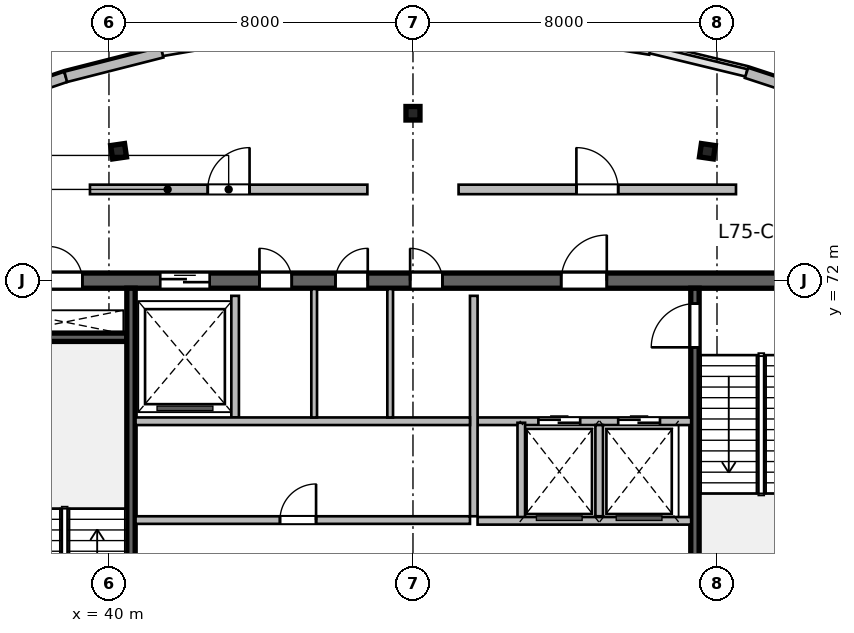
"""IFC4 building model, lengths in metres.
Left out: names, types, materials, properties, quantities, classifications, styles, units other than length and angle.
Written with IfcOpenShell. Run it as: python <this file> out.ifc"""

import sys

from ifc_helpers import new_model, si_unit, direction, frame, frame_2d, origin, origin_2d, place, context, subcontext, project, spatial, rectangle, i_section, extrude, source, transform, mapped, element, fill, save


model = new_model("IFC4")
c1 = context("Model", 3, precision=1e-05, world=origin(), true_north=direction((0.0, 1.0)))
c2 = subcontext(c1, "Body", "Model", "MODEL_VIEW")
j1 = project(units=[si_unit("LENGTHUNIT", "METRE"), si_unit("PLANEANGLEUNIT", "RADIAN")], contexts=[c1])
p1 = place(None, origin())
s1 = spatial("IfcSite", under=j1, at=p1, CompositionType="ELEMENT")
p2 = place(p1, origin())
s2 = spatial("IfcBuilding", under=s1, at=p2, CompositionType="ELEMENT")
p3 = place(p2, frame((0.0, 0.0, 307.8)))
s3 = spatial("IfcBuildingStorey", under=s2, at=p3, CompositionType="ELEMENT", Elevation=307.8)
m1 = source(origin(), c2, "Body", "SweptSolid", [
    extrude(rectangle(XDim=21.6, YDim=0.4, at=frame_2d((10.8, 0.0))), origin(), (0.0, 0.0, 1.0), 4.8),
])
p4 = place(p3, frame((37.2, 72.0, 0.0), z_axis=(0.0, 0.0, 1.0), x_axis=(1.0, 0.0, 0.0)))
e1 = element("IfcWall", 1, at=p4, inside=s3, PredefinedType="SHEAR", context=c2, shape_type="MappedRepresentation", body=[
    mapped(m1, transform((0.0, 0.0, 0.0), scale=1.0)),
])
p5 = place(p4, frame((1.2, 0.0, 0.0)))
e2 = element("IfcOpeningElement", 2, at=p5, cuts=e1, PredefinedType="OPENING", context=c2, shape_type="SweptSolid", body=[
    extrude(rectangle(XDim=0.9, YDim=2.1, at=frame_2d((0.45, 1.05))), frame((0.0, 0.21, 0.0), z_axis=(0.0, -1.0, 0.0), x_axis=(1.0, 0.0, 0.0)), (0.0, 0.0, 1.0), 0.42),
])
p6 = place(p4, frame((14.7, 0.0, 0.0)))
e3 = element("IfcOpeningElement", 3, at=p6, cuts=e1, PredefinedType="OPENING", context=c2, shape_type="SweptSolid", body=[
    extrude(rectangle(XDim=1.2, YDim=2.15, at=frame_2d((0.6, 1.075))), frame((0.0, 0.21, 0.0), z_axis=(0.0, -1.0, 0.0), x_axis=(1.0, 0.0, 0.0)), (0.0, 0.0, 1.0), 0.42),
])
p7 = place(p4, frame((4.15, 0.0, 0.0)))
e4 = element("IfcOpeningElement", 4, at=p7, cuts=e1, PredefinedType="OPENING", context=c2, shape_type="SweptSolid", body=[
    extrude(rectangle(XDim=1.3, YDim=2.15, at=frame_2d((0.65, 1.075))), frame((0.0, 0.21, 0.0), z_axis=(0.0, -1.0, 0.0), x_axis=(1.0, 0.0, 0.0)), (0.0, 0.0, 1.0), 0.42),
])
p8 = place(p4, frame((6.76, 0.0, 0.0)))
e5 = element("IfcOpeningElement", 5, at=p8, cuts=e1, PredefinedType="OPENING", context=c2, shape_type="SweptSolid", body=[
    extrude(rectangle(XDim=0.85, YDim=2.1, at=frame_2d((0.425, 1.05))), frame((0.0, 0.21, 0.0), z_axis=(0.0, -1.0, 0.0), x_axis=(1.0, 0.0, 0.0)), (0.0, 0.0, 1.0), 0.42),
])
p9 = place(p4, frame((8.76, 0.0, 0.0)))
e6 = element("IfcOpeningElement", 6, at=p9, cuts=e1, PredefinedType="OPENING", context=c2, shape_type="SweptSolid", body=[
    extrude(rectangle(XDim=0.85, YDim=2.1, at=frame_2d((0.425, 1.05))), frame((0.0, 0.21, 0.0), z_axis=(0.0, -1.0, 0.0), x_axis=(1.0, 0.0, 0.0)), (0.0, 0.0, 1.0), 0.42),
])
p10 = place(p4, frame((10.725, 0.0, 0.0)))
e7 = element("IfcOpeningElement", 7, at=p10, cuts=e1, PredefinedType="OPENING", context=c2, shape_type="SweptSolid", body=[
    extrude(rectangle(XDim=0.85, YDim=2.1, at=frame_2d((0.425, 1.05))), frame((0.0, 0.21, 0.0), z_axis=(0.0, -1.0, 0.0), x_axis=(1.0, 0.0, 0.0)), (0.0, 0.0, 1.0), 0.42),
])
m2 = source(origin(), c2, "Body", "SweptSolid", [
    extrude(rectangle(XDim=3.27, YDim=0.22, at=frame_2d((1.635, 0.0))), origin(), (0.0, 0.0, 1.0), 4.8),
])
p11 = place(p3, frame((37.2, 70.51, 0.0), z_axis=(0.0, 0.0, 1.0), x_axis=(1.0, 0.0, 0.0)))
e8 = element("IfcWall", 8, at=p11, inside=s3, PredefinedType="SHEAR", context=c2, shape_type="MappedRepresentation", body=[
    mapped(m2, transform((0.0, 0.0, 0.0), scale=1.0)),
])
m3 = source(origin(), c2, "Body", "SweptSolid", [
    extrude(rectangle(XDim=11.2, YDim=0.22, at=frame_2d((5.6, 0.0))), origin(), (0.0, 0.0, 1.0), 4.8),
])
p12 = place(p3, frame((40.58, 60.6, 0.0), z_axis=(0.0, 0.0, 1.0), x_axis=(0.0, 1.0, 0.0)))
e9 = element("IfcWall", 9, at=p12, inside=s3, PredefinedType="SHEAR", context=c2, shape_type="MappedRepresentation", body=[
    mapped(m3, transform((0.0, 0.0, 0.0), scale=1.0)),
])
p13 = place(p3, frame((55.42, 60.6, 0.0), z_axis=(0.0, 0.0, 1.0), x_axis=(0.0, 1.0, 0.0)))
e10 = element("IfcWall", 10, at=p13, inside=s3, PredefinedType="SHEAR", context=c2, shape_type="MappedRepresentation", body=[
    mapped(m3, transform((0.0, 0.0, 0.0), scale=1.0)),
])
p14 = place(p13, frame((9.645, 0.0, 0.0)))
e11 = element("IfcOpeningElement", 11, at=p14, cuts=e10, PredefinedType="OPENING", context=c2, shape_type="SweptSolid", body=[
    extrude(rectangle(XDim=1.15, YDim=2.15, at=frame_2d((0.575, 1.075))), frame((0.0, 0.12, 0.0), z_axis=(0.0, -1.0, 0.0), x_axis=(1.0, 0.0, 0.0)), (0.0, 0.0, 1.0), 0.24),
])
m4 = source(origin(), c2, "Body", "SweptSolid", [
    extrude(i_section(OverallWidth=0.369, OverallDepth=0.356, WebThickness=0.011, FlangeThickness=0.018, at=origin_2d()), origin(), (0.0, 0.0, 1.0), 4.8),
])
for number, where, z_axis, x_axis in (
    (12, (40.253, 75.404, 0.0), (0.0, 0.0, 1.0), (-0.143, 0.99, 0.0)),
    (13, (48.0, 76.404, 0.0), (0.0, 0.0, 1.0), (0.0, 1.0, 0.0)),
    (14, (55.747, 75.404, 0.0), (0.0, 0.0, 1.0), (0.143, 0.99, 0.0)),
):
    element("IfcColumn", number, at=place(p3, frame(where, z_axis=z_axis, x_axis=x_axis)), inside=s3, PredefinedType="COLUMN", context=c2, shape_type="MappedRepresentation", body=[
        mapped(m4, transform((0.0, 0.0, 0.0), scale=1.0)),
    ])
m5 = source(origin(), c2, "Body", "SweptSolid", [
    extrude(rectangle(XDim=2.64, YDim=0.28, at=frame_2d((1.32, 0.0))), origin(), (0.0, 0.0, 1.0), 4.5),
])
p15 = place(p3, frame((36.364, 76.511, 0.0), z_axis=(0.0, 0.0, 1.0), x_axis=(0.946685911962, 0.322158011064, 0.0)))
e15 = element("IfcWall", 15, at=p15, inside=s3, PredefinedType="SOLIDWALL", context=c2, shape_type="MappedRepresentation", body=[
    mapped(m5, transform((0.0, 0.0, 0.0), scale=1.0)),
])
m6 = source(origin(), c2, "Body", "SweptSolid", [
    extrude(rectangle(XDim=2.614, YDim=0.28, at=frame_2d((1.307, 0.0))), origin(), (0.0, 0.0, 1.0), 4.5),
])
p16 = place(p3, frame((38.863, 77.362, 0.0), z_axis=(0.0, 0.0, 1.0), x_axis=(0.969106509315, 0.246642602978, 0.0)))
e16 = element("IfcWall", 16, at=p16, inside=s3, PredefinedType="SOLIDWALL", context=c2, shape_type="MappedRepresentation", body=[
    mapped(m6, transform((0.0, 0.0, 0.0), scale=1.0)),
])
m7 = source(origin(), c2, "Body", "SweptSolid", [
    extrude(rectangle(XDim=2.593, YDim=0.28, at=frame_2d((1.296, 0.0))), origin(), (0.0, 0.0, 1.0), 4.5),
])
p17 = place(p3, frame((51.679, 78.488, 0.0), z_axis=(0.0, 0.0, 1.0), x_axis=(0.987661204406, -0.156605700126, 0.0)))
e17 = element("IfcWall", 17, at=p17, inside=s3, PredefinedType="SOLIDWALL", context=c2, shape_type="MappedRepresentation", body=[
    mapped(m7, transform((0.0, 0.0, 0.0), scale=1.0)),
])
m8 = source(origin(), c2, "Body", "SweptSolid", [
    extrude(rectangle(XDim=2.636, YDim=0.28, at=frame_2d((1.318, 0.0))), origin(), (0.0, 0.0, 1.0), 4.5),
])
p18 = place(p3, frame((56.777, 77.467, 0.0), z_axis=(0.0, 0.0, 1.0), x_axis=(0.950200321617, -0.311639774097, 0.0)))
e18 = element("IfcWall", 18, at=p18, inside=s3, PredefinedType="SOLIDWALL", context=c2, shape_type="MappedRepresentation", body=[
    mapped(m8, transform((0.0, 0.0, 0.0), scale=1.0)),
])
m9 = source(origin(), c2, "Body", "SweptSolid", [
    extrude(rectangle(XDim=5.62, YDim=0.2, at=frame_2d((2.81, 0.0))), origin(), (0.0, 0.0, 1.0), 4.5),
])
p19 = place(p3, frame((49.7, 68.3, 0.0), z_axis=(0.0, 0.0, 1.0), x_axis=(1.0, 0.0, 0.0)))
e19 = element("IfcWall", 19, at=p19, inside=s3, PredefinedType="SOLIDWALL", context=c2, shape_type="MappedRepresentation", body=[
    mapped(m9, transform((0.0, 0.0, 0.0), scale=1.0)),
])
p20 = place(p19, frame((1.6, 0.0, 0.0)))
e20 = element("IfcOpeningElement", 20, at=p20, cuts=e19, PredefinedType="OPENING", context=c2, shape_type="SweptSolid", body=[
    extrude(rectangle(XDim=1.1, YDim=2.15, at=frame_2d((0.55, 1.075))), frame((0.0, 0.11, 0.0), z_axis=(0.0, -1.0, 0.0), x_axis=(1.0, 0.0, 0.0)), (0.0, 0.0, 1.0), 0.22),
])
p21 = place(p19, frame((3.7, 0.0, 0.0)))
e21 = element("IfcOpeningElement", 21, at=p21, cuts=e19, PredefinedType="OPENING", context=c2, shape_type="SweptSolid", body=[
    extrude(rectangle(XDim=1.1, YDim=2.15, at=frame_2d((0.55, 1.075))), frame((0.0, 0.11, 0.0), z_axis=(0.0, -1.0, 0.0), x_axis=(1.0, 0.0, 0.0)), (0.0, 0.0, 1.0), 0.22),
])
m10 = source(origin(), c2, "Body", "SweptSolid", [
    extrude(rectangle(XDim=5.8, YDim=0.2, at=frame_2d((2.9, 0.0))), origin(), (0.0, 0.0, 1.0), 4.5),
])
p22 = place(p3, frame((49.6, 65.8, 0.0), z_axis=(0.0, 0.0, 1.0), x_axis=(0.0, 1.0, 0.0)))
e22 = element("IfcWall", 22, at=p22, inside=s3, PredefinedType="SOLIDWALL", context=c2, shape_type="MappedRepresentation", body=[
    mapped(m10, transform((0.0, 0.0, 0.0), scale=1.0)),
])
m11 = source(origin(), c2, "Body", "SweptSolid", [
    extrude(rectangle(XDim=2.58, YDim=0.2, at=frame_2d((1.29, 0.0))), origin(), (0.0, 0.0, 1.0), 4.5),
])
p23 = place(p3, frame((50.85, 65.68, 0.0), z_axis=(0.0, 0.0, 1.0), x_axis=(0.0, 1.0, 0.0)))
e23 = element("IfcWall", 23, at=p23, inside=s3, PredefinedType="SOLIDWALL", context=c2, shape_type="MappedRepresentation", body=[
    mapped(m11, transform((0.0, 0.0, 0.0), scale=1.0)),
])
m12 = source(origin(), c2, "Body", "SweptSolid", [
    extrude(rectangle(XDim=2.4, YDim=0.2, at=frame_2d((1.2, 0.0))), origin(), (0.0, 0.0, 1.0), 4.5),
])
p24 = place(p3, frame((52.9, 65.8, 0.0), z_axis=(0.0, 0.0, 1.0), x_axis=(0.0, 1.0, 0.0)))
e24 = element("IfcWall", 24, at=p24, inside=s3, PredefinedType="SOLIDWALL", context=c2, shape_type="MappedRepresentation", body=[
    mapped(m12, transform((0.0, 0.0, 0.0), scale=1.0)),
])
p25 = place(p3, frame((49.7, 65.68, 0.0), z_axis=(0.0, 0.0, 1.0), x_axis=(1.0, 0.0, 0.0)))
e25 = element("IfcWall", 25, at=p25, inside=s3, PredefinedType="SOLIDWALL", context=c2, shape_type="MappedRepresentation", body=[
    mapped(m9, transform((0.0, 0.0, 0.0), scale=1.0)),
])
m13 = source(origin(), c2, "Body", "SweptSolid", [
    extrude(rectangle(XDim=3.2, YDim=0.2, at=frame_2d((1.6, 0.0))), origin(), (0.0, 0.0, 1.0), 4.5),
])
p26 = place(p3, frame((43.32, 68.4, 0.0), z_axis=(0.0, 0.0, 1.0), x_axis=(0.0, 1.0, 0.0)))
e26 = element("IfcWall", 26, at=p26, inside=s3, PredefinedType="SOLIDWALL", context=c2, shape_type="MappedRepresentation", body=[
    mapped(m13, transform((0.0, 0.0, 0.0), scale=1.0)),
])
m14 = source(origin(), c2, "Body", "SweptSolid", [
    extrude(rectangle(XDim=8.8, YDim=0.2, at=frame_2d((4.4, 0.0))), origin(), (0.0, 0.0, 1.0), 4.5),
])
p27 = place(p3, frame((40.7, 68.3, 0.0), z_axis=(0.0, 0.0, 1.0), x_axis=(1.0, 0.0, 0.0)))
e27 = element("IfcWall", 27, at=p27, inside=s3, PredefinedType="SOLIDWALL", context=c2, shape_type="MappedRepresentation", body=[
    mapped(m14, transform((0.0, 0.0, 0.0), scale=1.0)),
])
m15 = source(origin(), c2, "Body", "SweptSolid", [
    extrude(rectangle(XDim=3.38, YDim=0.15, at=frame_2d((1.69, 0.0))), origin(), (0.0, 0.0, 1.0), 4.5),
])
for number, where, z_axis, x_axis in (
    (28, (45.4, 68.4, 0.0), (0.0, 0.0, 1.0), (0.0, 1.0, 0.0)),
    (29, (47.4, 68.4, 0.0), (0.0, 0.0, 1.0), (0.0, 1.0, 0.0)),
):
    element("IfcWall", number, at=place(p3, frame(where, z_axis=z_axis, x_axis=x_axis)), inside=s3, PredefinedType="PARTITIONING", context=c2, shape_type="MappedRepresentation", body=[
        mapped(m15, transform((0.0, 0.0, 0.0), scale=1.0)),
    ])
p28 = place(p3, frame((40.7, 65.7, 0.0), z_axis=(0.0, 0.0, 1.0), x_axis=(1.0, 0.0, 0.0)))
e30 = element("IfcWall", 30, at=p28, inside=s3, PredefinedType="SOLIDWALL", context=c2, shape_type="MappedRepresentation", body=[
    mapped(m14, transform((0.0, 0.0, 0.0), scale=1.0)),
])
p29 = place(p28, frame((3.8, 0.0, 0.0)))
e31 = element("IfcOpeningElement", 31, at=p29, cuts=e30, PredefinedType="OPENING", context=c2, shape_type="SweptSolid", body=[
    extrude(rectangle(XDim=0.95, YDim=2.15, at=frame_2d((0.475, 1.075))), frame((0.0, 0.11, 0.0), z_axis=(0.0, -1.0, 0.0), x_axis=(1.0, 0.0, 0.0)), (0.0, 0.0, 1.0), 0.22),
])
m16 = source(origin(), c2, "Body", "SweptSolid", [
    extrude(rectangle(XDim=7.3, YDim=0.25, at=frame_2d((3.65, 0.0))), origin(), (0.0, 0.0, 1.0), 4.5),
])
p30 = place(p3, frame((39.5, 74.4, 0.0), z_axis=(0.0, 0.0, 1.0), x_axis=(1.0, 0.0, 0.0)))
e32 = element("IfcWall", 32, at=p30, inside=s3, PredefinedType="PARTITIONING", context=c2, shape_type="MappedRepresentation", body=[
    mapped(m16, transform((0.0, 0.0, 0.0), scale=1.0)),
])
p31 = place(p30, frame((3.1, 0.0, 0.0)))
e33 = element("IfcOpeningElement", 33, at=p31, cuts=e32, PredefinedType="OPENING", context=c2, shape_type="SweptSolid", body=[
    extrude(rectangle(XDim=1.1, YDim=2.15, at=frame_2d((0.55, 1.075))), frame((0.0, 0.135, 0.0), z_axis=(0.0, -1.0, 0.0), x_axis=(1.0, 0.0, 0.0)), (0.0, 0.0, 1.0), 0.27),
])
p32 = place(p3, frame((49.2, 74.4, 0.0), z_axis=(0.0, 0.0, 1.0), x_axis=(1.0, 0.0, 0.0)))
e34 = element("IfcWall", 34, at=p32, inside=s3, PredefinedType="PARTITIONING", context=c2, shape_type="MappedRepresentation", body=[
    mapped(m16, transform((0.0, 0.0, 0.0), scale=1.0)),
])
p33 = place(p32, frame((3.1, 0.0, 0.0)))
e35 = element("IfcOpeningElement", 35, at=p33, cuts=e34, PredefinedType="OPENING", context=c2, shape_type="SweptSolid", body=[
    extrude(rectangle(XDim=1.1, YDim=2.15, at=frame_2d((0.55, 1.075))), frame((0.0, 0.135, 0.0), z_axis=(0.0, -1.0, 0.0), x_axis=(1.0, 0.0, 0.0)), (0.0, 0.0, 1.0), 0.27),
])
m17 = source(origin(), c2, "Body", "SweptSolid", [
    extrude(rectangle(XDim=0.9, YDim=2.1, at=frame_2d((0.45, 1.05))), frame((0.0, 0.025, 0.0), z_axis=(0.0, -1.0, 0.0), x_axis=(1.0, 0.0, 0.0)), (0.0, 0.0, 1.0), 0.05),
])
p34 = place(p5, origin())
e36 = element("IfcDoor", 36, at=p34, inside=s3, OperationType="SINGLE_SWING_LEFT", PredefinedType="DOOR", context=c2, shape_type="MappedRepresentation", body=[
    mapped(m17, transform((0.0, 0.0, 0.0), scale=1.0)),
])
fill(e2, e36)
m18 = source(origin(), c2, "Body", "SweptSolid", [
    extrude(rectangle(XDim=1.15, YDim=2.15, at=frame_2d((0.575, 1.075))), frame((0.0, 0.025, 0.0), z_axis=(0.0, -1.0, 0.0), x_axis=(1.0, 0.0, 0.0)), (0.0, 0.0, 1.0), 0.05),
])
p35 = place(p14, origin())
e37 = element("IfcDoor", 37, at=p35, inside=s3, OperationType="SINGLE_SWING_LEFT", PredefinedType="DOOR", context=c2, shape_type="MappedRepresentation", body=[
    mapped(m18, transform((0.0, 0.0, 0.0), scale=1.0)),
])
fill(e11, e37)
m19 = source(origin(), c2, "Body", "SweptSolid", [
    extrude(rectangle(XDim=1.2, YDim=2.15, at=frame_2d((0.6, 1.075))), frame((0.0, 0.025, 0.0), z_axis=(0.0, -1.0, 0.0), x_axis=(1.0, 0.0, 0.0)), (0.0, 0.0, 1.0), 0.05),
])
p36 = place(p6, origin())
e38 = element("IfcDoor", 38, at=p36, inside=s3, OperationType="SINGLE_SWING_RIGHT", PredefinedType="DOOR", context=c2, shape_type="MappedRepresentation", body=[
    mapped(m19, transform((0.0, 0.0, 0.0), scale=1.0)),
])
fill(e3, e38)
m20 = source(origin(), c2, "Body", "SweptSolid", [
    extrude(rectangle(XDim=1.1, YDim=2.15, at=frame_2d((0.55, 1.075))), frame((0.0, 0.025, 0.0), z_axis=(0.0, -1.0, 0.0), x_axis=(1.0, 0.0, 0.0)), (0.0, 0.0, 1.0), 0.05),
])
p37 = place(p20, origin())
e39 = element("IfcDoor", 39, at=p37, inside=s3, OperationType="DOUBLE_DOOR_SLIDING", PredefinedType="DOOR", context=c2, shape_type="MappedRepresentation", body=[
    mapped(m20, transform((0.0, 0.0, 0.0), scale=1.0)),
])
fill(e20, e39)
p38 = place(p21, origin())
e40 = element("IfcDoor", 40, at=p38, inside=s3, OperationType="DOUBLE_DOOR_SLIDING", PredefinedType="DOOR", context=c2, shape_type="MappedRepresentation", body=[
    mapped(m20, transform((0.0, 0.0, 0.0), scale=1.0)),
])
fill(e21, e40)
m21 = source(origin(), c2, "Body", "SweptSolid", [
    extrude(rectangle(XDim=1.3, YDim=2.15, at=frame_2d((0.65, 1.075))), frame((0.0, 0.025, 0.0), z_axis=(0.0, -1.0, 0.0), x_axis=(1.0, 0.0, 0.0)), (0.0, 0.0, 1.0), 0.05),
])
p39 = place(p7, origin())
e41 = element("IfcDoor", 41, at=p39, inside=s3, OperationType="DOUBLE_DOOR_SLIDING", PredefinedType="DOOR", context=c2, shape_type="MappedRepresentation", body=[
    mapped(m21, transform((0.0, 0.0, 0.0), scale=1.0)),
])
fill(e4, e41)
m22 = source(origin(), c2, "Body", "SweptSolid", [
    extrude(rectangle(XDim=0.85, YDim=2.1, at=frame_2d((0.425, 1.05))), frame((0.0, 0.025, 0.0), z_axis=(0.0, -1.0, 0.0), x_axis=(1.0, 0.0, 0.0)), (0.0, 0.0, 1.0), 0.05),
])
p40 = place(p8, origin())
e42 = element("IfcDoor", 42, at=p40, inside=s3, OperationType="SINGLE_SWING_LEFT", PredefinedType="DOOR", context=c2, shape_type="MappedRepresentation", body=[
    mapped(m22, transform((0.0, 0.0, 0.0), scale=1.0)),
])
fill(e5, e42)
p41 = place(p9, origin())
e43 = element("IfcDoor", 43, at=p41, inside=s3, OperationType="SINGLE_SWING_RIGHT", PredefinedType="DOOR", context=c2, shape_type="MappedRepresentation", body=[
    mapped(m22, transform((0.0, 0.0, 0.0), scale=1.0)),
])
fill(e6, e43)
p42 = place(p10, origin())
e44 = element("IfcDoor", 44, at=p42, inside=s3, OperationType="SINGLE_SWING_LEFT", PredefinedType="DOOR", context=c2, shape_type="MappedRepresentation", body=[
    mapped(m22, transform((0.0, 0.0, 0.0), scale=1.0)),
])
fill(e7, e44)
m23 = source(origin(), c2, "Body", "SweptSolid", [
    extrude(rectangle(XDim=0.95, YDim=2.15, at=frame_2d((0.475, 1.075))), frame((0.0, 0.025, 0.0), z_axis=(0.0, -1.0, 0.0), x_axis=(1.0, 0.0, 0.0)), (0.0, 0.0, 1.0), 0.05),
])
p43 = place(p29, origin())
e45 = element("IfcDoor", 45, at=p43, inside=s3, OperationType="SINGLE_SWING_RIGHT", PredefinedType="DOOR", context=c2, shape_type="MappedRepresentation", body=[
    mapped(m23, transform((0.0, 0.0, 0.0), scale=1.0)),
])
fill(e31, e45)
m24 = source(origin(), c2, "Body", "SweptSolid", [
    extrude(rectangle(XDim=1.1, YDim=2.15, at=frame_2d((0.55, 1.075))), frame((0.0, 0.025, 0.0), z_axis=(0.0, -1.0, 0.0), x_axis=(1.0, 0.0, 0.0)), (0.0, 0.0, 1.0), 0.05),
])
p44 = place(p31, origin())
e46 = element("IfcDoor", 46, at=p44, inside=s3, OperationType="SINGLE_SWING_RIGHT", PredefinedType="DOOR", context=c2, shape_type="MappedRepresentation", body=[
    mapped(m24, transform((0.0, 0.0, 0.0), scale=1.0)),
])
fill(e33, e46)
p45 = place(p33, origin())
e47 = element("IfcDoor", 47, at=p45, inside=s3, OperationType="SINGLE_SWING_LEFT", PredefinedType="DOOR", context=c2, shape_type="MappedRepresentation", body=[
    mapped(m24, transform((0.0, 0.0, 0.0), scale=1.0)),
])
fill(e35, e47)
save(model, sys.argv[1])
